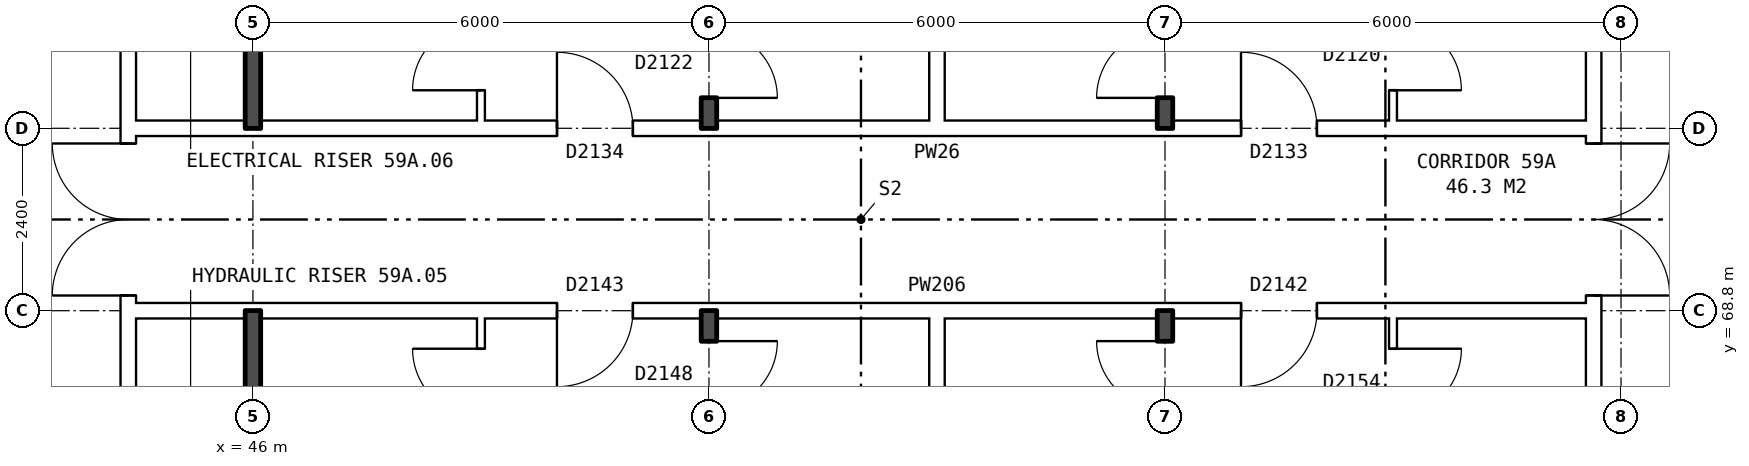
"""IFC4 building model, lengths in metres.
Left out: names, types, materials, properties, quantities, classifications, styles, units other than length and angle.
Written with IfcOpenShell. Run it as: python <this file> out.ifc"""

import sys

from ifc_helpers import new_model, si_unit, direction, frame, frame_2d, origin, place, context, subcontext, project, spatial, rectangle, extrude, element, fill, save


model = new_model("IFC4")
c1 = context("Model", 3, precision=1e-05, world=origin(), true_north=direction((0.0, 1.0)))
c2 = subcontext(c1, "Body", "Model", "MODEL_VIEW")
j1 = project(units=[si_unit("LENGTHUNIT", "METRE"), si_unit("PLANEANGLEUNIT", "RADIAN")], contexts=[c1])
p1 = place(None, origin())
s1 = spatial("IfcSite", under=j1, at=p1, CompositionType="ELEMENT")
p2 = place(p1, origin())
s2 = spatial("IfcBuilding", under=s1, at=p2, CompositionType="ELEMENT")
p3 = place(p2, frame((0.0, 0.0, 209.0)))
s3 = spatial("IfcBuildingStorey", under=s2, at=p3, CompositionType="ELEMENT", Elevation=209.0)
p4 = place(p3, frame((63.64, 63.9, 0.0), z_axis=(0.0, 0.0, 1.0), x_axis=(0.0, 1.0, 0.0)))
e1 = element("IfcWall", 1, at=p4, inside=s3, PredefinedType="PARTITIONING", context=c2, shape_type="SweptSolid", body=[
    extrude(rectangle(XDim=12.2, YDim=0.2, at=frame_2d((6.1, 0.0))), origin(), (0.0, 0.0, 1.0), 2.85),
])
p5 = place(p4, frame((5.1, 0.0, 0.0)))
e2 = element("IfcOpeningElement", 2, at=p5, cuts=e1, PredefinedType="OPENING", context=c2, shape_type="SweptSolid", body=[
    extrude(rectangle(XDim=2.0, YDim=2.1, at=frame_2d((1.0, 1.05))), frame((0.0, 0.11, 0.0), z_axis=(0.0, -1.0, 0.0), x_axis=(1.0, 0.0, 0.0)), (0.0, 0.0, 1.0), 0.22),
])
p6 = place(p3, frame((44.36, 63.9, 0.0), z_axis=(0.0, 0.0, 1.0), x_axis=(0.0, 1.0, 0.0)))
e3 = element("IfcWall", 3, at=p6, inside=s3, PredefinedType="PARTITIONING", context=c2, shape_type="SweptSolid", body=[
    extrude(rectangle(XDim=12.2, YDim=0.2, at=frame_2d((6.1, 0.0))), origin(), (0.0, 0.0, 1.0), 2.85),
])
p7 = place(p6, frame((5.1, 0.0, 0.0)))
e4 = element("IfcOpeningElement", 4, at=p7, cuts=e3, PredefinedType="OPENING", context=c2, shape_type="SweptSolid", body=[
    extrude(rectangle(XDim=2.0, YDim=2.1, at=frame_2d((1.0, 1.05))), frame((0.0, 0.11, 0.0), z_axis=(0.0, -1.0, 0.0), x_axis=(1.0, 0.0, 0.0)), (0.0, 0.0, 1.0), 0.22),
])
p8 = place(p3, frame((44.36, 68.8, 0.0), z_axis=(0.0, 0.0, 1.0), x_axis=(1.0, 0.0, 0.0)))
e5 = element("IfcWall", 5, at=p8, inside=s3, PredefinedType="PARTITIONING", context=c2, shape_type="SweptSolid", body=[
    extrude(rectangle(XDim=19.28, YDim=0.2, at=frame_2d((9.64, 0.0))), origin(), (0.0, 0.0, 1.0), 2.85),
])
p9 = place(p8, frame((14.64, 0.0, 0.0)))
e6 = element("IfcOpeningElement", 6, at=p9, cuts=e5, PredefinedType="OPENING", context=c2, shape_type="SweptSolid", body=[
    extrude(rectangle(XDim=1.0, YDim=2.1, at=frame_2d((0.5, 1.05))), frame((0.0, 0.11, 0.0), z_axis=(0.0, -1.0, 0.0), x_axis=(1.0, 0.0, 0.0)), (0.0, 0.0, 1.0), 0.22),
])
p10 = place(p8, frame((5.64, 0.0, 0.0)))
e7 = element("IfcOpeningElement", 7, at=p10, cuts=e5, PredefinedType="OPENING", context=c2, shape_type="SweptSolid", body=[
    extrude(rectangle(XDim=1.0, YDim=2.1, at=frame_2d((0.5, 1.05))), frame((0.0, 0.11, 0.0), z_axis=(0.0, -1.0, 0.0), x_axis=(1.0, 0.0, 0.0)), (0.0, 0.0, 1.0), 0.22),
])
p11 = place(p3, frame((44.36, 71.2, 0.0), z_axis=(0.0, 0.0, 1.0), x_axis=(1.0, 0.0, 0.0)))
e8 = element("IfcWall", 8, at=p11, inside=s3, PredefinedType="PARTITIONING", context=c2, shape_type="SweptSolid", body=[
    extrude(rectangle(XDim=19.28, YDim=0.2, at=frame_2d((9.64, 0.0))), origin(), (0.0, 0.0, 1.0), 2.85),
])
p12 = place(p11, frame((14.64, 0.0, 0.0)))
e9 = element("IfcOpeningElement", 9, at=p12, cuts=e8, PredefinedType="OPENING", context=c2, shape_type="SweptSolid", body=[
    extrude(rectangle(XDim=1.0, YDim=2.1, at=frame_2d((0.5, 1.05))), frame((0.0, 0.11, 0.0), z_axis=(0.0, -1.0, 0.0), x_axis=(1.0, 0.0, 0.0)), (0.0, 0.0, 1.0), 0.22),
])
p13 = place(p11, frame((5.64, 0.0, 0.0)))
e10 = element("IfcOpeningElement", 10, at=p13, cuts=e8, PredefinedType="OPENING", context=c2, shape_type="SweptSolid", body=[
    extrude(rectangle(XDim=1.0, YDim=2.1, at=frame_2d((0.5, 1.05))), frame((0.0, 0.11, 0.0), z_axis=(0.0, -1.0, 0.0), x_axis=(1.0, 0.0, 0.0)), (0.0, 0.0, 1.0), 0.22),
])
for number, where, z_axis, x_axis in (
    (11, (46.0, 54.36, 0.0), (0.0, 0.0, 1.0), (0.0, 1.0, 0.0)),
    (12, (46.0, 71.2, 0.0), (0.0, 0.0, 1.0), (0.0, 1.0, 0.0)),
):
    element("IfcWall", number, at=place(p3, frame(where, z_axis=z_axis, x_axis=x_axis)), inside=s3, PredefinedType="SOLIDWALL", context=c2, shape_type="SweptSolid", body=[
        extrude(rectangle(XDim=14.44, YDim=0.2, at=frame_2d((7.22, 0.0))), origin(), (0.0, 0.0, 1.0), 2.85),
    ])
p14 = place(p3, frame((49.0, 54.36, 0.0), z_axis=(0.0, 0.0, 1.0), x_axis=(0.0, 1.0, 0.0)))
e13 = element("IfcWall", 13, at=p14, inside=s3, PredefinedType="PARTITIONING", context=c2, shape_type="SweptSolid", body=[
    extrude(rectangle(XDim=14.34, YDim=0.1, at=frame_2d((7.17, 0.0))), origin(), (0.0, 0.0, 1.0), 2.85),
])
p15 = place(p14, frame((5.5, 0.0, 0.0)))
e14 = element("IfcOpeningElement", 14, at=p15, cuts=e13, PredefinedType="OPENING", context=c2, shape_type="SweptSolid", body=[
    extrude(rectangle(XDim=0.9, YDim=2.1, at=frame_2d((0.45, 1.05))), frame((0.0, 0.06, 0.0), z_axis=(0.0, -1.0, 0.0), x_axis=(1.0, 0.0, 0.0)), (0.0, 0.0, 1.0), 0.12),
])
p16 = place(p14, frame((13.04, 0.0, 0.0)))
e15 = element("IfcOpeningElement", 15, at=p16, cuts=e13, PredefinedType="OPENING", context=c2, shape_type="SweptSolid", body=[
    extrude(rectangle(XDim=0.9, YDim=2.1, at=frame_2d((0.45, 1.05))), frame((0.0, 0.06, 0.0), z_axis=(0.0, -1.0, 0.0), x_axis=(1.0, 0.0, 0.0)), (0.0, 0.0, 1.0), 0.12),
])
p17 = place(p3, frame((49.0, 71.3, 0.0), z_axis=(0.0, 0.0, 1.0), x_axis=(0.0, 1.0, 0.0)))
e16 = element("IfcWall", 16, at=p17, inside=s3, PredefinedType="PARTITIONING", context=c2, shape_type="SweptSolid", body=[
    extrude(rectangle(XDim=14.34, YDim=0.1, at=frame_2d((7.17, 0.0))), origin(), (0.0, 0.0, 1.0), 2.85),
])
p18 = place(p17, frame((6.74, 0.0, 0.0)))
e17 = element("IfcOpeningElement", 17, at=p18, cuts=e16, PredefinedType="OPENING", context=c2, shape_type="SweptSolid", body=[
    extrude(rectangle(XDim=0.9, YDim=2.1, at=frame_2d((0.45, 1.05))), frame((0.0, 0.06, 0.0), z_axis=(0.0, -1.0, 0.0), x_axis=(1.0, 0.0, 0.0)), (0.0, 0.0, 1.0), 0.12),
])
p19 = place(p17, frame((0.4, 0.0, 0.0)))
e18 = element("IfcOpeningElement", 18, at=p19, cuts=e16, PredefinedType="OPENING", context=c2, shape_type="SweptSolid", body=[
    extrude(rectangle(XDim=0.9, YDim=2.1, at=frame_2d((0.45, 1.05))), frame((0.0, 0.06, 0.0), z_axis=(0.0, -1.0, 0.0), x_axis=(1.0, 0.0, 0.0)), (0.0, 0.0, 1.0), 0.12),
])
p20 = place(p3, frame((52.0, 54.36, 0.0), z_axis=(0.0, 0.0, 1.0), x_axis=(0.0, 1.0, 0.0)))
e19 = element("IfcWall", 19, at=p20, inside=s3, PredefinedType="SOLIDWALL", context=c2, shape_type="SweptSolid", body=[
    extrude(rectangle(XDim=14.44, YDim=0.2, at=frame_2d((7.22, 0.0))), origin(), (0.0, 0.0, 1.0), 2.85),
])
p21 = place(p20, frame((5.5, 0.0, 0.0)))
e20 = element("IfcOpeningElement", 20, at=p21, cuts=e19, PredefinedType="OPENING", context=c2, shape_type="SweptSolid", body=[
    extrude(rectangle(XDim=0.9, YDim=2.1, at=frame_2d((0.45, 1.05))), frame((0.0, 0.11, 0.0), z_axis=(0.0, -1.0, 0.0), x_axis=(1.0, 0.0, 0.0)), (0.0, 0.0, 1.0), 0.22),
])
p22 = place(p20, frame((13.14, 0.0, 0.0)))
e21 = element("IfcOpeningElement", 21, at=p22, cuts=e19, PredefinedType="OPENING", context=c2, shape_type="SweptSolid", body=[
    extrude(rectangle(XDim=0.9, YDim=2.1, at=frame_2d((0.45, 1.05))), frame((0.0, 0.11, 0.0), z_axis=(0.0, -1.0, 0.0), x_axis=(1.0, 0.0, 0.0)), (0.0, 0.0, 1.0), 0.22),
])
p23 = place(p3, frame((52.0, 71.2, 0.0), z_axis=(0.0, 0.0, 1.0), x_axis=(0.0, 1.0, 0.0)))
e22 = element("IfcWall", 22, at=p23, inside=s3, PredefinedType="SOLIDWALL", context=c2, shape_type="SweptSolid", body=[
    extrude(rectangle(XDim=14.44, YDim=0.2, at=frame_2d((7.22, 0.0))), origin(), (0.0, 0.0, 1.0), 2.85),
])
p24 = place(p23, frame((6.84, 0.0, 0.0)))
e23 = element("IfcOpeningElement", 23, at=p24, cuts=e22, PredefinedType="OPENING", context=c2, shape_type="SweptSolid", body=[
    extrude(rectangle(XDim=0.9, YDim=2.1, at=frame_2d((0.45, 1.05))), frame((0.0, 0.11, 0.0), z_axis=(0.0, -1.0, 0.0), x_axis=(1.0, 0.0, 0.0)), (0.0, 0.0, 1.0), 0.22),
])
p25 = place(p23, frame((0.4, 0.0, 0.0)))
e24 = element("IfcOpeningElement", 24, at=p25, cuts=e22, PredefinedType="OPENING", context=c2, shape_type="SweptSolid", body=[
    extrude(rectangle(XDim=0.9, YDim=2.1, at=frame_2d((0.45, 1.05))), frame((0.0, 0.11, 0.0), z_axis=(0.0, -1.0, 0.0), x_axis=(1.0, 0.0, 0.0)), (0.0, 0.0, 1.0), 0.22),
])
for number, where, z_axis, x_axis in (
    (25, (55.0, 54.36, 0.0), (0.0, 0.0, 1.0), (0.0, 1.0, 0.0)),
    (26, (55.0, 71.3, 0.0), (0.0, 0.0, 1.0), (0.0, 1.0, 0.0)),
):
    element("IfcWall", number, at=place(p3, frame(where, z_axis=z_axis, x_axis=x_axis)), inside=s3, PredefinedType="PARTITIONING", context=c2, shape_type="SweptSolid", body=[
        extrude(rectangle(XDim=14.34, YDim=0.2, at=frame_2d((7.17, 0.0))), origin(), (0.0, 0.0, 1.0), 2.85),
    ])
p26 = place(p3, frame((58.0, 54.36, 0.0), z_axis=(0.0, 0.0, 1.0), x_axis=(0.0, 1.0, 0.0)))
e27 = element("IfcWall", 27, at=p26, inside=s3, PredefinedType="SOLIDWALL", context=c2, shape_type="SweptSolid", body=[
    extrude(rectangle(XDim=14.44, YDim=0.2, at=frame_2d((7.22, 0.0))), origin(), (0.0, 0.0, 1.0), 2.85),
])
p27 = place(p26, frame((4.2, 0.0, 0.0)))
e28 = element("IfcOpeningElement", 28, at=p27, cuts=e27, PredefinedType="OPENING", context=c2, shape_type="SweptSolid", body=[
    extrude(rectangle(XDim=0.9, YDim=2.1, at=frame_2d((0.45, 1.05))), frame((0.0, 0.11, 0.0), z_axis=(0.0, -1.0, 0.0), x_axis=(1.0, 0.0, 0.0)), (0.0, 0.0, 1.0), 0.22),
])
p28 = place(p26, frame((13.14, 0.0, 0.0)))
e29 = element("IfcOpeningElement", 29, at=p28, cuts=e27, PredefinedType="OPENING", context=c2, shape_type="SweptSolid", body=[
    extrude(rectangle(XDim=0.9, YDim=2.1, at=frame_2d((0.45, 1.05))), frame((0.0, 0.11, 0.0), z_axis=(0.0, -1.0, 0.0), x_axis=(1.0, 0.0, 0.0)), (0.0, 0.0, 1.0), 0.22),
])
p29 = place(p3, frame((58.0, 71.2, 0.0), z_axis=(0.0, 0.0, 1.0), x_axis=(0.0, 1.0, 0.0)))
e30 = element("IfcWall", 30, at=p29, inside=s3, PredefinedType="SOLIDWALL", context=c2, shape_type="SweptSolid", body=[
    extrude(rectangle(XDim=14.44, YDim=0.2, at=frame_2d((7.22, 0.0))), origin(), (0.0, 0.0, 1.0), 2.85),
])
p30 = place(p29, frame((5.84, 0.0, 0.0)))
e31 = element("IfcOpeningElement", 31, at=p30, cuts=e30, PredefinedType="OPENING", context=c2, shape_type="SweptSolid", body=[
    extrude(rectangle(XDim=0.9, YDim=2.1, at=frame_2d((0.45, 1.05))), frame((0.0, 0.11, 0.0), z_axis=(0.0, -1.0, 0.0), x_axis=(1.0, 0.0, 0.0)), (0.0, 0.0, 1.0), 0.22),
])
p31 = place(p29, frame((0.4, 0.0, 0.0)))
e32 = element("IfcOpeningElement", 32, at=p31, cuts=e30, PredefinedType="OPENING", context=c2, shape_type="SweptSolid", body=[
    extrude(rectangle(XDim=0.9, YDim=2.1, at=frame_2d((0.45, 1.05))), frame((0.0, 0.11, 0.0), z_axis=(0.0, -1.0, 0.0), x_axis=(1.0, 0.0, 0.0)), (0.0, 0.0, 1.0), 0.22),
])
p32 = place(p3, frame((61.0, 54.36, 0.0), z_axis=(0.0, 0.0, 1.0), x_axis=(0.0, 1.0, 0.0)))
e33 = element("IfcWall", 33, at=p32, inside=s3, PredefinedType="PARTITIONING", context=c2, shape_type="SweptSolid", body=[
    extrude(rectangle(XDim=14.34, YDim=0.1, at=frame_2d((7.17, 0.0))), origin(), (0.0, 0.0, 1.0), 2.85),
])
p33 = place(p32, frame((4.2, 0.0, 0.0)))
e34 = element("IfcOpeningElement", 34, at=p33, cuts=e33, PredefinedType="OPENING", context=c2, shape_type="SweptSolid", body=[
    extrude(rectangle(XDim=0.9, YDim=2.1, at=frame_2d((0.45, 1.05))), frame((0.0, 0.06, 0.0), z_axis=(0.0, -1.0, 0.0), x_axis=(1.0, 0.0, 0.0)), (0.0, 0.0, 1.0), 0.12),
])
p34 = place(p32, frame((13.04, 0.0, 0.0)))
e35 = element("IfcOpeningElement", 35, at=p34, cuts=e33, PredefinedType="OPENING", context=c2, shape_type="SweptSolid", body=[
    extrude(rectangle(XDim=0.9, YDim=2.1, at=frame_2d((0.45, 1.05))), frame((0.0, 0.06, 0.0), z_axis=(0.0, -1.0, 0.0), x_axis=(1.0, 0.0, 0.0)), (0.0, 0.0, 1.0), 0.12),
])
p35 = place(p3, frame((61.0, 71.3, 0.0), z_axis=(0.0, 0.0, 1.0), x_axis=(0.0, 1.0, 0.0)))
e36 = element("IfcWall", 36, at=p35, inside=s3, PredefinedType="PARTITIONING", context=c2, shape_type="SweptSolid", body=[
    extrude(rectangle(XDim=14.34, YDim=0.1, at=frame_2d((7.17, 0.0))), origin(), (0.0, 0.0, 1.0), 2.85),
])
p36 = place(p35, frame((5.74, 0.0, 0.0)))
e37 = element("IfcOpeningElement", 37, at=p36, cuts=e36, PredefinedType="OPENING", context=c2, shape_type="SweptSolid", body=[
    extrude(rectangle(XDim=0.9, YDim=2.1, at=frame_2d((0.45, 1.05))), frame((0.0, 0.06, 0.0), z_axis=(0.0, -1.0, 0.0), x_axis=(1.0, 0.0, 0.0)), (0.0, 0.0, 1.0), 0.12),
])
p37 = place(p35, frame((0.4, 0.0, 0.0)))
e38 = element("IfcOpeningElement", 38, at=p37, cuts=e36, PredefinedType="OPENING", context=c2, shape_type="SweptSolid", body=[
    extrude(rectangle(XDim=0.9, YDim=2.1, at=frame_2d((0.45, 1.05))), frame((0.0, 0.06, 0.0), z_axis=(0.0, -1.0, 0.0), x_axis=(1.0, 0.0, 0.0)), (0.0, 0.0, 1.0), 0.12),
])
p38 = place(p5, frame((2.0, 0.0, 0.0), z_axis=(0.0, 0.0, 1.0), x_axis=(-1.0, 0.0, 0.0)))
e39 = element("IfcDoor", 39, at=p38, inside=s3, OperationType="DOUBLE_DOOR_SINGLE_SWING", PredefinedType="DOOR", context=c2, shape_type="SweptSolid", body=[
    extrude(rectangle(XDim=2.0, YDim=2.1, at=frame_2d((1.0, 1.05))), frame((0.0, 0.025, 0.0), z_axis=(0.0, -1.0, 0.0), x_axis=(1.0, 0.0, 0.0)), (0.0, 0.0, 1.0), 0.05),
])
fill(e2, e39)
p39 = place(p7, origin())
e40 = element("IfcDoor", 40, at=p39, inside=s3, OperationType="DOUBLE_DOOR_SINGLE_SWING", PredefinedType="DOOR", context=c2, shape_type="SweptSolid", body=[
    extrude(rectangle(XDim=2.0, YDim=2.1, at=frame_2d((1.0, 1.05))), frame((0.0, 0.025, 0.0), z_axis=(0.0, -1.0, 0.0), x_axis=(1.0, 0.0, 0.0)), (0.0, 0.0, 1.0), 0.05),
])
fill(e4, e40)
p40 = place(p9, frame((1.0, 0.0, 0.0), z_axis=(0.0, 0.0, 1.0), x_axis=(-1.0, 0.0, 0.0)))
e41 = element("IfcDoor", 41, at=p40, inside=s3, OperationType="SINGLE_SWING_RIGHT", PredefinedType="DOOR", context=c2, shape_type="SweptSolid", body=[
    extrude(rectangle(XDim=1.0, YDim=2.1, at=frame_2d((0.5, 1.05))), frame((0.0, 0.025, 0.0), z_axis=(0.0, -1.0, 0.0), x_axis=(1.0, 0.0, 0.0)), (0.0, 0.0, 1.0), 0.05),
])
fill(e6, e41)
p41 = place(p34, frame((0.9, 0.0, 0.0), z_axis=(0.0, 0.0, 1.0), x_axis=(-1.0, 0.0, 0.0)))
e42 = element("IfcDoor", 42, at=p41, inside=s3, OperationType="SINGLE_SWING_LEFT", PredefinedType="DOOR", context=c2, shape_type="SweptSolid", body=[
    extrude(rectangle(XDim=0.9, YDim=2.1, at=frame_2d((0.45, 1.05))), frame((0.0, 0.025, 0.0), z_axis=(0.0, -1.0, 0.0), x_axis=(1.0, 0.0, 0.0)), (0.0, 0.0, 1.0), 0.05),
])
fill(e35, e42)
p42 = place(p28, origin())
e43 = element("IfcDoor", 43, at=p42, inside=s3, OperationType="SINGLE_SWING_RIGHT", PredefinedType="DOOR", context=c2, shape_type="SweptSolid", body=[
    extrude(rectangle(XDim=0.9, YDim=2.1, at=frame_2d((0.45, 1.05))), frame((0.0, 0.025, 0.0), z_axis=(0.0, -1.0, 0.0), x_axis=(1.0, 0.0, 0.0)), (0.0, 0.0, 1.0), 0.05),
])
fill(e29, e43)
p43 = place(p10, frame((1.0, 0.0, 0.0), z_axis=(0.0, 0.0, 1.0), x_axis=(-1.0, 0.0, 0.0)))
e44 = element("IfcDoor", 44, at=p43, inside=s3, OperationType="SINGLE_SWING_RIGHT", PredefinedType="DOOR", context=c2, shape_type="SweptSolid", body=[
    extrude(rectangle(XDim=1.0, YDim=2.1, at=frame_2d((0.5, 1.05))), frame((0.0, 0.025, 0.0), z_axis=(0.0, -1.0, 0.0), x_axis=(1.0, 0.0, 0.0)), (0.0, 0.0, 1.0), 0.05),
])
fill(e7, e44)
p44 = place(p22, frame((0.9, 0.0, 0.0), z_axis=(0.0, 0.0, 1.0), x_axis=(-1.0, 0.0, 0.0)))
e45 = element("IfcDoor", 45, at=p44, inside=s3, OperationType="SINGLE_SWING_LEFT", PredefinedType="DOOR", context=c2, shape_type="SweptSolid", body=[
    extrude(rectangle(XDim=0.9, YDim=2.1, at=frame_2d((0.45, 1.05))), frame((0.0, 0.025, 0.0), z_axis=(0.0, -1.0, 0.0), x_axis=(1.0, 0.0, 0.0)), (0.0, 0.0, 1.0), 0.05),
])
fill(e21, e45)
p45 = place(p16, origin())
e46 = element("IfcDoor", 46, at=p45, inside=s3, OperationType="SINGLE_SWING_RIGHT", PredefinedType="DOOR", context=c2, shape_type="SweptSolid", body=[
    extrude(rectangle(XDim=0.9, YDim=2.1, at=frame_2d((0.45, 1.05))), frame((0.0, 0.025, 0.0), z_axis=(0.0, -1.0, 0.0), x_axis=(1.0, 0.0, 0.0)), (0.0, 0.0, 1.0), 0.05),
])
fill(e15, e46)
p46 = place(p12, origin())
e47 = element("IfcDoor", 47, at=p46, inside=s3, OperationType="SINGLE_SWING_LEFT", PredefinedType="DOOR", context=c2, shape_type="SweptSolid", body=[
    extrude(rectangle(XDim=1.0, YDim=2.1, at=frame_2d((0.5, 1.05))), frame((0.0, 0.025, 0.0), z_axis=(0.0, -1.0, 0.0), x_axis=(1.0, 0.0, 0.0)), (0.0, 0.0, 1.0), 0.05),
])
fill(e9, e47)
p47 = place(p37, frame((0.9, 0.0, 0.0), z_axis=(0.0, 0.0, 1.0), x_axis=(-1.0, 0.0, 0.0)))
e48 = element("IfcDoor", 48, at=p47, inside=s3, OperationType="SINGLE_SWING_RIGHT", PredefinedType="DOOR", context=c2, shape_type="SweptSolid", body=[
    extrude(rectangle(XDim=0.9, YDim=2.1, at=frame_2d((0.45, 1.05))), frame((0.0, 0.025, 0.0), z_axis=(0.0, -1.0, 0.0), x_axis=(1.0, 0.0, 0.0)), (0.0, 0.0, 1.0), 0.05),
])
fill(e38, e48)
p48 = place(p31, origin())
e49 = element("IfcDoor", 49, at=p48, inside=s3, OperationType="SINGLE_SWING_LEFT", PredefinedType="DOOR", context=c2, shape_type="SweptSolid", body=[
    extrude(rectangle(XDim=0.9, YDim=2.1, at=frame_2d((0.45, 1.05))), frame((0.0, 0.025, 0.0), z_axis=(0.0, -1.0, 0.0), x_axis=(1.0, 0.0, 0.0)), (0.0, 0.0, 1.0), 0.05),
])
fill(e32, e49)
p49 = place(p13, origin())
e50 = element("IfcDoor", 50, at=p49, inside=s3, OperationType="SINGLE_SWING_LEFT", PredefinedType="DOOR", context=c2, shape_type="SweptSolid", body=[
    extrude(rectangle(XDim=1.0, YDim=2.1, at=frame_2d((0.5, 1.05))), frame((0.0, 0.025, 0.0), z_axis=(0.0, -1.0, 0.0), x_axis=(1.0, 0.0, 0.0)), (0.0, 0.0, 1.0), 0.05),
])
fill(e10, e50)
p50 = place(p25, frame((0.9, 0.0, 0.0), z_axis=(0.0, 0.0, 1.0), x_axis=(-1.0, 0.0, 0.0)))
e51 = element("IfcDoor", 51, at=p50, inside=s3, OperationType="SINGLE_SWING_RIGHT", PredefinedType="DOOR", context=c2, shape_type="SweptSolid", body=[
    extrude(rectangle(XDim=0.9, YDim=2.1, at=frame_2d((0.45, 1.05))), frame((0.0, 0.025, 0.0), z_axis=(0.0, -1.0, 0.0), x_axis=(1.0, 0.0, 0.0)), (0.0, 0.0, 1.0), 0.05),
])
fill(e24, e51)
p51 = place(p19, origin())
e52 = element("IfcDoor", 52, at=p51, inside=s3, OperationType="SINGLE_SWING_LEFT", PredefinedType="DOOR", context=c2, shape_type="SweptSolid", body=[
    extrude(rectangle(XDim=0.9, YDim=2.1, at=frame_2d((0.45, 1.05))), frame((0.0, 0.025, 0.0), z_axis=(0.0, -1.0, 0.0), x_axis=(1.0, 0.0, 0.0)), (0.0, 0.0, 1.0), 0.05),
])
fill(e18, e52)
save(model, sys.argv[1])
